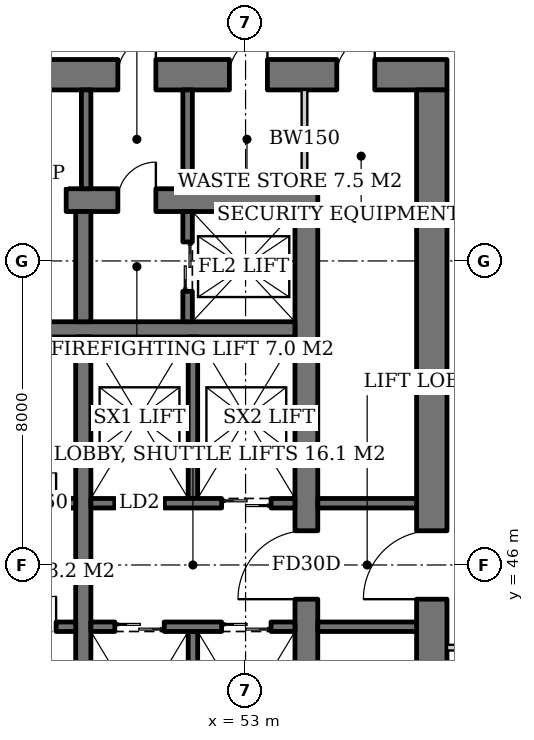
"""IFC4 building model, lengths in metres.
Left out: names, types, materials, properties, quantities, classifications, styles, units other than length and angle.
Written with IfcOpenShell. Run it as: python <this file> out.ifc"""

import sys

from ifc_helpers import new_model, si_unit, direction, frame, frame_2d, origin, place, context, subcontext, project, spatial, rectangle, extrude, element, fill, save


model = new_model("IFC4")
c1 = context("Model", 3, precision=1e-05, world=origin(), true_north=direction((0.0, 1.0)))
c2 = subcontext(c1, "Body", "Model", "MODEL_VIEW")
j1 = project(units=[si_unit("LENGTHUNIT", "METRE"), si_unit("PLANEANGLEUNIT", "RADIAN")], contexts=[c1])
p1 = place(None, origin())
s1 = spatial("IfcSite", under=j1, at=p1, CompositionType="ELEMENT")
p2 = place(p1, origin())
s2 = spatial("IfcBuilding", under=s1, at=p2, CompositionType="ELEMENT")
p3 = place(p2, frame((0.0, 0.0, 6.0)))
s3 = spatial("IfcBuildingStorey", under=s2, at=p3, CompositionType="ELEMENT", Elevation=6.0)
p4 = place(p3, frame((35.1, 55.6, 0.0), z_axis=(0.0, 0.0, 1.0), x_axis=(1.0, 0.0, 0.0)))
e1 = element("IfcWall", 1, at=p4, inside=s3, PredefinedType="SHEAR", context=c2, shape_type="SweptSolid", body=[
    extrude(rectangle(XDim=19.8, YDim=0.6, at=frame_2d((9.9, 0.0))), origin(), (0.0, 0.0, 1.0), 5.0),
])
p5 = place(p4, frame((14.54, 0.0, 0.0)))
e2 = element("IfcOpeningElement", 2, at=p5, cuts=e1, PredefinedType="OPENING", context=c2, shape_type="SweptSolid", body=[
    extrude(rectangle(XDim=1.0, YDim=2.1, at=frame_2d((0.5, 1.05))), frame((0.0, 0.31, 0.0), z_axis=(0.0, -1.0, 0.0), x_axis=(1.0, 0.0, 0.0)), (0.0, 0.0, 1.0), 0.62),
])
p6 = place(p4, frame((12.18, 0.0, 0.0)))
e3 = element("IfcOpeningElement", 3, at=p6, cuts=e1, PredefinedType="OPENING", context=c2, shape_type="SweptSolid", body=[
    extrude(rectangle(XDim=1.0, YDim=2.1, at=frame_2d((0.5, 1.05))), frame((0.0, 0.31, 0.0), z_axis=(0.0, -1.0, 0.0), x_axis=(1.0, 0.0, 0.0)), (0.0, 0.0, 1.0), 0.62),
])
p7 = place(p4, frame((2.425, 0.0, 0.0)))
e4 = element("IfcOpeningElement", 4, at=p7, cuts=e1, PredefinedType="OPENING", context=c2, shape_type="SweptSolid", body=[
    extrude(rectangle(XDim=1.0, YDim=2.1, at=frame_2d((0.5, 1.05))), frame((0.0, 0.31, 0.0), z_axis=(0.0, -1.0, 0.0), x_axis=(1.0, 0.0, 0.0)), (0.0, 0.0, 1.0), 0.62),
])
p8 = place(p3, frame((54.6, 36.7, 0.0), z_axis=(0.0, 0.0, 1.0), x_axis=(0.0, 1.0, 0.0)))
e5 = element("IfcWall", 5, at=p8, inside=s3, PredefinedType="SHEAR", context=c2, shape_type="SweptSolid", body=[
    extrude(rectangle(XDim=18.6, YDim=0.6, at=frame_2d((9.3, 0.0))), origin(), (0.0, 0.0, 1.0), 5.0),
])
p9 = place(p8, frame((8.4, 0.0, 0.0)))
e6 = element("IfcOpeningElement", 6, at=p9, cuts=e5, PredefinedType="OPENING", context=c2, shape_type="SweptSolid", body=[
    extrude(rectangle(XDim=1.8, YDim=2.4, at=frame_2d((0.9, 1.2))), frame((0.0, 0.31, 0.0), z_axis=(0.0, -1.0, 0.0), x_axis=(1.0, 0.0, 0.0)), (0.0, 0.0, 1.0), 0.62),
])
p10 = place(p3, frame((31.7, 58.9, 0.0), z_axis=(0.0, 0.0, 1.0), x_axis=(1.0, 0.0, 0.0)))
e7 = element("IfcWall", 7, at=p10, inside=s3, PredefinedType="SHEAR", context=c2, shape_type="SweptSolid", body=[
    extrude(rectangle(XDim=26.6, YDim=0.8, at=frame_2d((13.3, 0.0))), origin(), (0.0, 0.0, 1.0), 5.0),
])
p11 = place(p10, frame((17.94, 0.0, 0.0)))
e8 = element("IfcOpeningElement", 8, at=p11, cuts=e7, PredefinedType="OPENING", context=c2, shape_type="SweptSolid", body=[
    extrude(rectangle(XDim=1.0, YDim=2.1, at=frame_2d((0.5, 1.05))), frame((0.0, 0.41, 0.0), z_axis=(0.0, -1.0, 0.0), x_axis=(1.0, 0.0, 0.0)), (0.0, 0.0, 1.0), 0.82),
])
p12 = place(p10, frame((12.44, 0.0, 0.0)))
e9 = element("IfcOpeningElement", 9, at=p12, cuts=e7, PredefinedType="OPENING", context=c2, shape_type="SweptSolid", body=[
    extrude(rectangle(XDim=1.0, YDim=2.1, at=frame_2d((0.5, 1.05))), frame((0.0, 0.41, 0.0), z_axis=(0.0, -1.0, 0.0), x_axis=(1.0, 0.0, 0.0)), (0.0, 0.0, 1.0), 0.82),
])
p13 = place(p10, frame((5.825, 0.0, 0.0)))
e10 = element("IfcOpeningElement", 10, at=p13, cuts=e7, PredefinedType="OPENING", context=c2, shape_type="SweptSolid", body=[
    extrude(rectangle(XDim=1.0, YDim=2.1, at=frame_2d((0.5, 1.05))), frame((0.0, 0.41, 0.0), z_axis=(0.0, -1.0, 0.0), x_axis=(1.0, 0.0, 0.0)), (0.0, 0.0, 1.0), 0.82),
])
p14 = place(p10, frame((1.139, 0.0, 0.0)))
e11 = element("IfcOpeningElement", 11, at=p14, cuts=e7, PredefinedType="OPENING", context=c2, shape_type="SweptSolid", body=[
    extrude(rectangle(XDim=1.0, YDim=2.1, at=frame_2d((0.5, 1.05))), frame((0.0, 0.41, 0.0), z_axis=(0.0, -1.0, 0.0), x_axis=(1.0, 0.0, 0.0)), (0.0, 0.0, 1.0), 0.82),
])
p15 = place(p10, frame((2.661, 0.0, 0.0)))
e12 = element("IfcOpeningElement", 12, at=p15, cuts=e7, PredefinedType="OPENING", context=c2, shape_type="SweptSolid", body=[
    extrude(rectangle(XDim=1.0, YDim=2.1, at=frame_2d((0.5, 1.05))), frame((0.0, 0.41, 0.0), z_axis=(0.0, -1.0, 0.0), x_axis=(1.0, 0.0, 0.0)), (0.0, 0.0, 1.0), 0.82),
])
p16 = place(p10, frame((4.204, 0.0, 0.0)))
e13 = element("IfcOpeningElement", 13, at=p16, cuts=e7, PredefinedType="OPENING", context=c2, shape_type="SweptSolid", body=[
    extrude(rectangle(XDim=1.0, YDim=2.1, at=frame_2d((0.5, 1.05))), frame((0.0, 0.41, 0.0), z_axis=(0.0, -1.0, 0.0), x_axis=(1.0, 0.0, 0.0)), (0.0, 0.0, 1.0), 0.82),
])
p17 = place(p10, frame((20.875, 0.0, 0.0)))
e14 = element("IfcOpeningElement", 14, at=p17, cuts=e7, PredefinedType="OPENING", context=c2, shape_type="SweptSolid", body=[
    extrude(rectangle(XDim=1.0, YDim=2.1, at=frame_2d((0.5, 1.05))), frame((0.0, 0.41, 0.0), z_axis=(0.0, -1.0, 0.0), x_axis=(1.0, 0.0, 0.0)), (0.0, 0.0, 1.0), 0.82),
])
p18 = place(p10, frame((23.7, 0.0, 0.0)))
e15 = element("IfcOpeningElement", 15, at=p18, cuts=e7, PredefinedType="OPENING", context=c2, shape_type="SweptSolid", body=[
    extrude(rectangle(XDim=1.0, YDim=2.1, at=frame_2d((0.5, 1.05))), frame((0.0, 0.41, 0.0), z_axis=(0.0, -1.0, 0.0), x_axis=(1.0, 0.0, 0.0)), (0.0, 0.0, 1.0), 0.82),
])
p19 = place(p3, frame((57.9, 33.5, 0.0), z_axis=(0.0, 0.0, 1.0), x_axis=(0.0, 1.0, 0.0)))
e16 = element("IfcWall", 16, at=p19, inside=s3, PredefinedType="SHEAR", context=c2, shape_type="SweptSolid", body=[
    extrude(rectangle(XDim=25.0, YDim=0.8, at=frame_2d((12.5, 0.0))), origin(), (0.0, 0.0, 1.0), 5.0),
])
p20 = place(p19, frame((11.6, 0.0, 0.0)))
e17 = element("IfcOpeningElement", 17, at=p20, cuts=e16, PredefinedType="OPENING", context=c2, shape_type="SweptSolid", body=[
    extrude(rectangle(XDim=1.8, YDim=2.4, at=frame_2d((0.9, 1.2))), frame((0.0, 0.41, 0.0), z_axis=(0.0, -1.0, 0.0), x_axis=(1.0, 0.0, 0.0)), (0.0, 0.0, 1.0), 0.82),
])
p21 = place(p3, frame((35.7, 52.2, 0.0), z_axis=(0.0, 0.0, 1.0), x_axis=(1.0, 0.0, 0.0)))
e18 = element("IfcWall", 18, at=p21, inside=s3, PredefinedType="SHEAR", context=c2, shape_type="SweptSolid", body=[
    extrude(rectangle(XDim=18.6, YDim=0.4, at=frame_2d((9.3, 0.0))), origin(), (0.0, 0.0, 1.0), 5.0),
])
p22 = place(p3, frame((48.73, 40.0, 0.0), z_axis=(0.0, 0.0, 1.0), x_axis=(0.0, 1.0, 0.0)))
e19 = element("IfcWall", 19, at=p22, inside=s3, PredefinedType="SHEAR", context=c2, shape_type="SweptSolid", body=[
    extrude(rectangle(XDim=12.0, YDim=0.4, at=frame_2d((6.0, 0.0))), origin(), (0.0, 0.0, 1.0), 5.0),
])
p23 = place(p3, frame((48.73, 52.4, 0.0), z_axis=(0.0, 0.0, 1.0), x_axis=(0.0, 1.0, 0.0)))
e20 = element("IfcWall", 20, at=p23, inside=s3, PredefinedType="SHEAR", context=c2, shape_type="SweptSolid", body=[
    extrude(rectangle(XDim=2.9, YDim=0.4, at=frame_2d((1.45, 0.0))), origin(), (0.0, 0.0, 1.0), 5.0),
])
p24 = place(p3, frame((51.475, 52.4, 0.0), z_axis=(0.0, 0.0, 1.0), x_axis=(0.0, 1.0, 0.0)))
e21 = element("IfcWall", 21, at=p24, inside=s3, PredefinedType="SHEAR", context=c2, shape_type="SweptSolid", body=[
    extrude(rectangle(XDim=2.9, YDim=0.25, at=frame_2d((1.45, 0.0))), origin(), (0.0, 0.0, 1.0), 5.0),
])
p25 = place(p24, frame((0.8, 0.0, 0.0)))
e22 = element("IfcOpeningElement", 22, at=p25, cuts=e21, PredefinedType="OPENING", context=c2, shape_type="SweptSolid", body=[
    extrude(rectangle(XDim=1.3, YDim=2.2, at=frame_2d((0.65, 1.1))), frame((0.0, 0.135, 0.0), z_axis=(0.0, -1.0, 0.0), x_axis=(1.0, 0.0, 0.0)), (0.0, 0.0, 1.0), 0.27),
])
p26 = place(p3, frame((35.7, 47.625, 0.0), z_axis=(0.0, 0.0, 1.0), x_axis=(1.0, 0.0, 0.0)))
e23 = element("IfcWall", 23, at=p26, inside=s3, PredefinedType="SHEAR", context=c2, shape_type="SweptSolid", body=[
    extrude(rectangle(XDim=12.83, YDim=0.25, at=frame_2d((6.415, 0.0))), origin(), (0.0, 0.0, 1.0), 5.0),
])
p27 = place(p26, frame((0.7, 0.0, 0.0)))
e24 = element("IfcOpeningElement", 24, at=p27, cuts=e23, PredefinedType="OPENING", context=c2, shape_type="SweptSolid", body=[
    extrude(rectangle(XDim=1.1, YDim=2.2, at=frame_2d((0.55, 1.1))), frame((0.0, 0.135, 0.0), z_axis=(0.0, -1.0, 0.0), x_axis=(1.0, 0.0, 0.0)), (0.0, 0.0, 1.0), 0.27),
])
p28 = place(p26, frame((3.45, 0.0, 0.0)))
e25 = element("IfcOpeningElement", 25, at=p28, cuts=e23, PredefinedType="OPENING", context=c2, shape_type="SweptSolid", body=[
    extrude(rectangle(XDim=1.1, YDim=2.2, at=frame_2d((0.55, 1.1))), frame((0.0, 0.135, 0.0), z_axis=(0.0, -1.0, 0.0), x_axis=(1.0, 0.0, 0.0)), (0.0, 0.0, 1.0), 0.27),
])
p29 = place(p26, frame((6.2, 0.0, 0.0)))
e26 = element("IfcOpeningElement", 26, at=p29, cuts=e23, PredefinedType="OPENING", context=c2, shape_type="SweptSolid", body=[
    extrude(rectangle(XDim=1.1, YDim=2.2, at=frame_2d((0.55, 1.1))), frame((0.0, 0.135, 0.0), z_axis=(0.0, -1.0, 0.0), x_axis=(1.0, 0.0, 0.0)), (0.0, 0.0, 1.0), 0.27),
])
p30 = place(p26, frame((8.95, 0.0, 0.0)))
e27 = element("IfcOpeningElement", 27, at=p30, cuts=e23, PredefinedType="OPENING", context=c2, shape_type="SweptSolid", body=[
    extrude(rectangle(XDim=1.1, YDim=2.2, at=frame_2d((0.55, 1.1))), frame((0.0, 0.135, 0.0), z_axis=(0.0, -1.0, 0.0), x_axis=(1.0, 0.0, 0.0)), (0.0, 0.0, 1.0), 0.27),
])
p31 = place(p26, frame((11.515, 0.0, 0.0)))
e28 = element("IfcOpeningElement", 28, at=p31, cuts=e23, PredefinedType="OPENING", context=c2, shape_type="SweptSolid", body=[
    extrude(rectangle(XDim=0.8, YDim=2.0, at=frame_2d((0.4, 1.0))), frame((0.0, 0.135, 0.0), z_axis=(0.0, -1.0, 0.0), x_axis=(1.0, 0.0, 0.0)), (0.0, 0.0, 1.0), 0.27),
])
p32 = place(p3, frame((35.7, 44.375, 0.0), z_axis=(0.0, 0.0, 1.0), x_axis=(1.0, 0.0, 0.0)))
e29 = element("IfcWall", 29, at=p32, inside=s3, PredefinedType="SHEAR", context=c2, shape_type="SweptSolid", body=[
    extrude(rectangle(XDim=12.83, YDim=0.25, at=frame_2d((6.415, 0.0))), origin(), (0.0, 0.0, 1.0), 5.0),
])
p33 = place(p32, frame((0.7, 0.0, 0.0)))
e30 = element("IfcOpeningElement", 30, at=p33, cuts=e29, PredefinedType="OPENING", context=c2, shape_type="SweptSolid", body=[
    extrude(rectangle(XDim=1.1, YDim=2.2, at=frame_2d((0.55, 1.1))), frame((0.0, 0.135, 0.0), z_axis=(0.0, -1.0, 0.0), x_axis=(1.0, 0.0, 0.0)), (0.0, 0.0, 1.0), 0.27),
])
p34 = place(p32, frame((3.45, 0.0, 0.0)))
e31 = element("IfcOpeningElement", 31, at=p34, cuts=e29, PredefinedType="OPENING", context=c2, shape_type="SweptSolid", body=[
    extrude(rectangle(XDim=1.1, YDim=2.2, at=frame_2d((0.55, 1.1))), frame((0.0, 0.135, 0.0), z_axis=(0.0, -1.0, 0.0), x_axis=(1.0, 0.0, 0.0)), (0.0, 0.0, 1.0), 0.27),
])
p35 = place(p32, frame((6.2, 0.0, 0.0)))
e32 = element("IfcOpeningElement", 32, at=p35, cuts=e29, PredefinedType="OPENING", context=c2, shape_type="SweptSolid", body=[
    extrude(rectangle(XDim=1.1, YDim=2.2, at=frame_2d((0.55, 1.1))), frame((0.0, 0.135, 0.0), z_axis=(0.0, -1.0, 0.0), x_axis=(1.0, 0.0, 0.0)), (0.0, 0.0, 1.0), 0.27),
])
p36 = place(p32, frame((8.95, 0.0, 0.0)))
e33 = element("IfcOpeningElement", 33, at=p36, cuts=e29, PredefinedType="OPENING", context=c2, shape_type="SweptSolid", body=[
    extrude(rectangle(XDim=1.1, YDim=2.2, at=frame_2d((0.55, 1.1))), frame((0.0, 0.135, 0.0), z_axis=(0.0, -1.0, 0.0), x_axis=(1.0, 0.0, 0.0)), (0.0, 0.0, 1.0), 0.27),
])
p37 = place(p32, frame((11.515, 0.0, 0.0)))
e34 = element("IfcOpeningElement", 34, at=p37, cuts=e29, PredefinedType="OPENING", context=c2, shape_type="SweptSolid", body=[
    extrude(rectangle(XDim=0.8, YDim=2.0, at=frame_2d((0.4, 1.0))), frame((0.0, 0.135, 0.0), z_axis=(0.0, -1.0, 0.0), x_axis=(1.0, 0.0, 0.0)), (0.0, 0.0, 1.0), 0.27),
])
p38 = place(p3, frame((51.615, 47.75, 0.0), z_axis=(0.0, 0.0, 1.0), x_axis=(0.0, 1.0, 0.0)))
e35 = element("IfcWall", 35, at=p38, inside=s3, PredefinedType="SHEAR", context=c2, shape_type="SweptSolid", body=[
    extrude(rectangle(XDim=4.25, YDim=0.25, at=frame_2d((2.125, 0.0))), origin(), (0.0, 0.0, 1.0), 5.0),
])
p39 = place(p3, frame((48.93, 47.625, 0.0), z_axis=(0.0, 0.0, 1.0), x_axis=(1.0, 0.0, 0.0)))
e36 = element("IfcWall", 36, at=p39, inside=s3, PredefinedType="SHEAR", context=c2, shape_type="SweptSolid", body=[
    extrude(rectangle(XDim=5.37, YDim=0.25, at=frame_2d((2.685, 0.0))), origin(), (0.0, 0.0, 1.0), 5.0),
])
p40 = place(p39, frame((0.63, 0.0, 0.0)))
e37 = element("IfcOpeningElement", 37, at=p40, cuts=e36, PredefinedType="OPENING", context=c2, shape_type="SweptSolid", body=[
    extrude(rectangle(XDim=1.3, YDim=2.2, at=frame_2d((0.65, 1.1))), frame((0.0, 0.135, 0.0), z_axis=(0.0, -1.0, 0.0), x_axis=(1.0, 0.0, 0.0)), (0.0, 0.0, 1.0), 0.27),
])
p41 = place(p39, frame((3.44, 0.0, 0.0)))
e38 = element("IfcOpeningElement", 38, at=p41, cuts=e36, PredefinedType="OPENING", context=c2, shape_type="SweptSolid", body=[
    extrude(rectangle(XDim=1.3, YDim=2.2, at=frame_2d((0.65, 1.1))), frame((0.0, 0.135, 0.0), z_axis=(0.0, -1.0, 0.0), x_axis=(1.0, 0.0, 0.0)), (0.0, 0.0, 1.0), 0.27),
])
p42 = place(p3, frame((51.615, 44.25, 0.0), z_axis=(0.0, 0.0, 1.0), x_axis=(0.0, -1.0, 0.0)))
e39 = element("IfcWall", 39, at=p42, inside=s3, PredefinedType="SHEAR", context=c2, shape_type="SweptSolid", body=[
    extrude(rectangle(XDim=4.25, YDim=0.25, at=frame_2d((2.125, 0.0))), origin(), (0.0, 0.0, 1.0), 5.0),
])
p43 = place(p3, frame((48.93, 44.375, 0.0), z_axis=(0.0, 0.0, 1.0), x_axis=(1.0, 0.0, 0.0)))
e40 = element("IfcWall", 40, at=p43, inside=s3, PredefinedType="SHEAR", context=c2, shape_type="SweptSolid", body=[
    extrude(rectangle(XDim=5.37, YDim=0.25, at=frame_2d((2.685, 0.0))), origin(), (0.0, 0.0, 1.0), 5.0),
])
p44 = place(p43, frame((0.63, 0.0, 0.0)))
e41 = element("IfcOpeningElement", 41, at=p44, cuts=e40, PredefinedType="OPENING", context=c2, shape_type="SweptSolid", body=[
    extrude(rectangle(XDim=1.3, YDim=2.2, at=frame_2d((0.65, 1.1))), frame((0.0, 0.135, 0.0), z_axis=(0.0, -1.0, 0.0), x_axis=(1.0, 0.0, 0.0)), (0.0, 0.0, 1.0), 0.27),
])
p45 = place(p43, frame((3.44, 0.0, 0.0)))
e42 = element("IfcOpeningElement", 42, at=p45, cuts=e40, PredefinedType="OPENING", context=c2, shape_type="SweptSolid", body=[
    extrude(rectangle(XDim=1.3, YDim=2.2, at=frame_2d((0.65, 1.1))), frame((0.0, 0.135, 0.0), z_axis=(0.0, -1.0, 0.0), x_axis=(1.0, 0.0, 0.0)), (0.0, 0.0, 1.0), 0.27),
])
for number, where, z_axis, x_axis in (
    (43, (48.805, 55.9, 0.0), (0.0, 0.0, 1.0), (0.0, 1.0, 0.0)),
    (44, (51.475, 55.9, 0.0), (0.0, 0.0, 1.0), (0.0, 1.0, 0.0)),
    (45, (54.9, 44.375, 0.0), (0.0, 0.0, 1.0), (1.0, 0.0, 0.0)),
    (46, (54.9, 47.625, 0.0), (0.0, 0.0, 1.0), (1.0, 0.0, 0.0)),
):
    element("IfcWall", number, at=place(p3, frame(where, z_axis=z_axis, x_axis=x_axis)), inside=s3, PredefinedType="SOLIDWALL", context=c2, shape_type="SweptSolid", body=[
        extrude(rectangle(XDim=2.6, YDim=0.25, at=frame_2d((1.3, 0.0))), origin(), (0.0, 0.0, 1.0), 4.7),
    ])
p46 = place(p3, frame((54.55, 55.9, 0.0), z_axis=(0.0, 0.0, 1.0), x_axis=(0.0, 1.0, 0.0)))
e47 = element("IfcWall", 47, at=p46, inside=s3, PredefinedType="SOLIDWALL", context=c2, shape_type="SweptSolid", body=[
    extrude(rectangle(XDim=2.6, YDim=0.15, at=frame_2d((1.3, 0.0))), origin(), (0.0, 0.0, 1.0), 4.7),
])
p47 = place(p3, frame((60.825, 43.825, 0.0), z_axis=(0.0, 0.0, 1.0), x_axis=(-1.0, 0.0, 0.0)))
e48 = element("IfcWall", 48, at=p47, inside=s3, PredefinedType="PARTITIONING", context=c2, shape_type="SweptSolid", body=[
    extrude(rectangle(XDim=2.525, YDim=0.15, at=frame_2d((1.262, 0.0))), origin(), (0.0, 0.0, 1.0), 4.7),
])
p48 = place(p25, origin())
e49 = element("IfcDoor", 49, at=p48, inside=s3, OperationType="DOUBLE_DOOR_SLIDING", PredefinedType="DOOR", context=c2, shape_type="SweptSolid", body=[
    extrude(rectangle(XDim=1.3, YDim=2.2, at=frame_2d((0.65, 1.1))), frame((0.0, 0.025, 0.0), z_axis=(0.0, -1.0, 0.0), x_axis=(1.0, 0.0, 0.0)), (0.0, 0.0, 1.0), 0.05),
])
fill(e22, e49)
p49 = place(p31, origin())
e50 = element("IfcDoor", 50, at=p49, inside=s3, OperationType="SINGLE_SWING_RIGHT", PredefinedType="DOOR", context=c2, shape_type="SweptSolid", body=[
    extrude(rectangle(XDim=0.8, YDim=2.0, at=frame_2d((0.4, 1.0))), frame((0.0, 0.025, 0.0), z_axis=(0.0, -1.0, 0.0), x_axis=(1.0, 0.0, 0.0)), (0.0, 0.0, 1.0), 0.05),
])
fill(e28, e50)
p50 = place(p37, origin())
e51 = element("IfcDoor", 51, at=p50, inside=s3, OperationType="SINGLE_SWING_RIGHT", PredefinedType="DOOR", context=c2, shape_type="SweptSolid", body=[
    extrude(rectangle(XDim=0.8, YDim=2.0, at=frame_2d((0.4, 1.0))), frame((0.0, 0.025, 0.0), z_axis=(0.0, -1.0, 0.0), x_axis=(1.0, 0.0, 0.0)), (0.0, 0.0, 1.0), 0.05),
])
fill(e34, e51)
p51 = place(p40, origin())
e52 = element("IfcDoor", 52, at=p51, inside=s3, OperationType="DOUBLE_DOOR_SLIDING", PredefinedType="DOOR", context=c2, shape_type="SweptSolid", body=[
    extrude(rectangle(XDim=1.3, YDim=2.2, at=frame_2d((0.65, 1.1))), frame((0.0, 0.025, 0.0), z_axis=(0.0, -1.0, 0.0), x_axis=(1.0, 0.0, 0.0)), (0.0, 0.0, 1.0), 0.05),
])
fill(e37, e52)
p52 = place(p41, origin())
e53 = element("IfcDoor", 53, at=p52, inside=s3, OperationType="DOUBLE_DOOR_SLIDING", PredefinedType="DOOR", context=c2, shape_type="SweptSolid", body=[
    extrude(rectangle(XDim=1.3, YDim=2.2, at=frame_2d((0.65, 1.1))), frame((0.0, 0.025, 0.0), z_axis=(0.0, -1.0, 0.0), x_axis=(1.0, 0.0, 0.0)), (0.0, 0.0, 1.0), 0.05),
])
fill(e38, e53)
p53 = place(p44, origin())
e54 = element("IfcDoor", 54, at=p53, inside=s3, OperationType="DOUBLE_DOOR_SLIDING", PredefinedType="DOOR", context=c2, shape_type="SweptSolid", body=[
    extrude(rectangle(XDim=1.3, YDim=2.2, at=frame_2d((0.65, 1.1))), frame((0.0, 0.025, 0.0), z_axis=(0.0, -1.0, 0.0), x_axis=(1.0, 0.0, 0.0)), (0.0, 0.0, 1.0), 0.05),
])
fill(e41, e54)
p54 = place(p45, origin())
e55 = element("IfcDoor", 55, at=p54, inside=s3, OperationType="DOUBLE_DOOR_SLIDING", PredefinedType="DOOR", context=c2, shape_type="SweptSolid", body=[
    extrude(rectangle(XDim=1.3, YDim=2.2, at=frame_2d((0.65, 1.1))), frame((0.0, 0.025, 0.0), z_axis=(0.0, -1.0, 0.0), x_axis=(1.0, 0.0, 0.0)), (0.0, 0.0, 1.0), 0.05),
])
fill(e42, e55)
p55 = place(p5, origin())
e56 = element("IfcDoor", 56, at=p55, inside=s3, OperationType="SINGLE_SWING_RIGHT", PredefinedType="DOOR", context=c2, shape_type="SweptSolid", body=[
    extrude(rectangle(XDim=1.0, YDim=2.1, at=frame_2d((0.5, 1.05))), frame((0.0, 0.025, 0.0), z_axis=(0.0, -1.0, 0.0), x_axis=(1.0, 0.0, 0.0)), (0.0, 0.0, 1.0), 0.05),
])
fill(e2, e56)
p56 = place(p9, origin())
e57 = element("IfcDoor", 57, at=p56, inside=s3, OperationType="DOUBLE_DOOR_SINGLE_SWING", PredefinedType="DOOR", context=c2, shape_type="SweptSolid", body=[
    extrude(rectangle(XDim=1.8, YDim=2.4, at=frame_2d((0.9, 1.2))), frame((0.0, 0.025, 0.0), z_axis=(0.0, -1.0, 0.0), x_axis=(1.0, 0.0, 0.0)), (0.0, 0.0, 1.0), 0.05),
])
fill(e6, e57)
p57 = place(p6, origin())
e58 = element("IfcDoor", 58, at=p57, inside=s3, OperationType="SINGLE_SWING_RIGHT", PredefinedType="DOOR", context=c2, shape_type="SweptSolid", body=[
    extrude(rectangle(XDim=1.0, YDim=2.1, at=frame_2d((0.5, 1.05))), frame((0.0, 0.025, 0.0), z_axis=(0.0, -1.0, 0.0), x_axis=(1.0, 0.0, 0.0)), (0.0, 0.0, 1.0), 0.05),
])
fill(e3, e58)
p58 = place(p20, origin())
e59 = element("IfcDoor", 59, at=p58, inside=s3, OperationType="DOUBLE_DOOR_SINGLE_SWING", PredefinedType="DOOR", context=c2, shape_type="SweptSolid", body=[
    extrude(rectangle(XDim=1.8, YDim=2.4, at=frame_2d((0.9, 1.2))), frame((0.0, 0.025, 0.0), z_axis=(0.0, -1.0, 0.0), x_axis=(1.0, 0.0, 0.0)), (0.0, 0.0, 1.0), 0.05),
])
fill(e17, e59)
p59 = place(p11, origin())
e60 = element("IfcDoor", 60, at=p59, inside=s3, OperationType="SINGLE_SWING_RIGHT", PredefinedType="DOOR", context=c2, shape_type="SweptSolid", body=[
    extrude(rectangle(XDim=1.0, YDim=2.1, at=frame_2d((0.5, 1.05))), frame((0.0, 0.025, 0.0), z_axis=(0.0, -1.0, 0.0), x_axis=(1.0, 0.0, 0.0)), (0.0, 0.0, 1.0), 0.05),
])
fill(e8, e60)
p60 = place(p17, origin())
e61 = element("IfcDoor", 61, at=p60, inside=s3, OperationType="SINGLE_SWING_RIGHT", PredefinedType="DOOR", context=c2, shape_type="SweptSolid", body=[
    extrude(rectangle(XDim=1.0, YDim=2.1, at=frame_2d((0.5, 1.05))), frame((0.0, -0.34, 0.0), z_axis=(0.0, -1.0, 0.0), x_axis=(1.0, 0.0, 0.0)), (0.0, 0.0, 1.0), 0.05),
])
fill(e14, e61)
p61 = place(p18, origin())
e62 = element("IfcDoor", 62, at=p61, inside=s3, OperationType="SINGLE_SWING_RIGHT", PredefinedType="DOOR", context=c2, shape_type="SweptSolid", body=[
    extrude(rectangle(XDim=1.0, YDim=2.1, at=frame_2d((0.5, 1.05))), frame((0.0, -0.34, 0.0), z_axis=(0.0, -1.0, 0.0), x_axis=(1.0, 0.0, 0.0)), (0.0, 0.0, 1.0), 0.05),
])
fill(e15, e62)
save(model, sys.argv[1])
